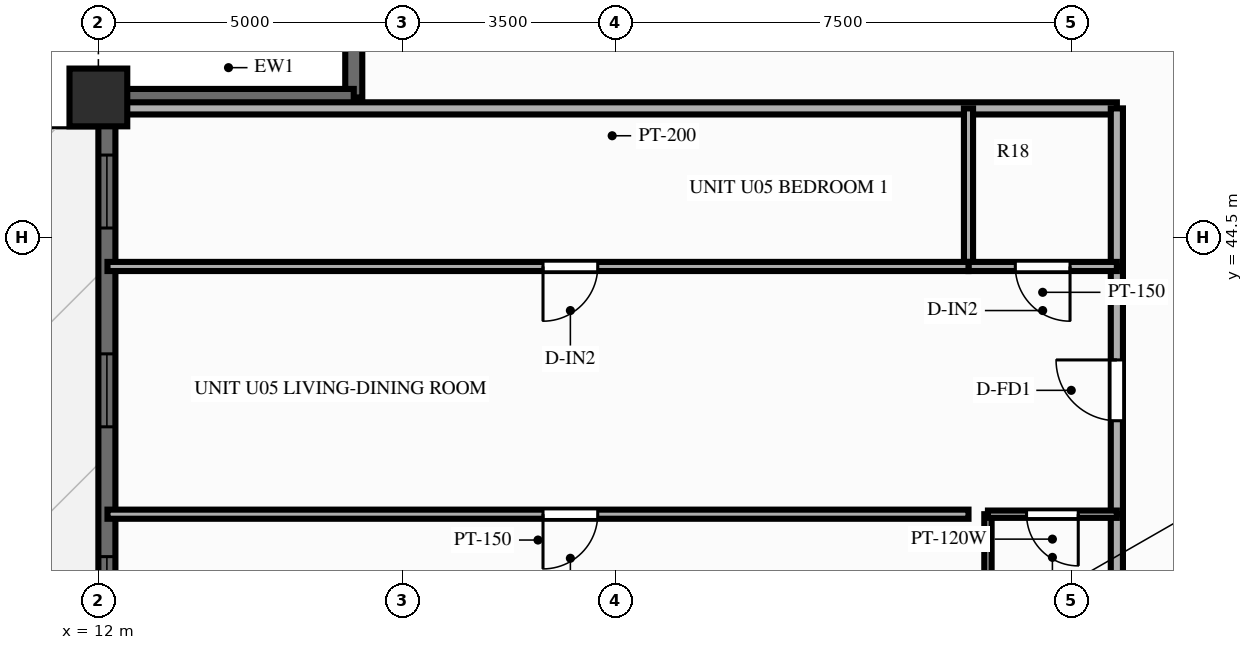
"""IFC4 building model, lengths in metres.
Left out: names, types, materials, properties, quantities, classifications, styles, units other than length and angle.
Written with IfcOpenShell. Run it as: python <this file> out.ifc"""

import sys

from ifc_helpers import new_model, si_unit, direction, frame, frame_2d, origin, origin_2d, place, context, subcontext, project, spatial, rectangle, extrude, source, transform, mapped, element, fill, save


model = new_model("IFC4")
c1 = context("Model", 3, precision=1e-05, world=origin(), true_north=direction((0.0, 1.0)))
c2 = subcontext(c1, "Body", "Model", "MODEL_VIEW")
j1 = project(units=[si_unit("LENGTHUNIT", "METRE"), si_unit("PLANEANGLEUNIT", "RADIAN")], contexts=[c1])
p1 = place(None, origin())
s1 = spatial("IfcSite", under=j1, at=p1, CompositionType="ELEMENT")
p2 = place(p1, origin())
s2 = spatial("IfcBuilding", under=s1, at=p2, CompositionType="ELEMENT")
p3 = place(p2, frame((0.0, 0.0, 138.75)))
s3 = spatial("IfcBuildingStorey", under=s2, at=p3, CompositionType="ELEMENT", Elevation=138.75)
m1 = source(origin(), c2, "Body", "SweptSolid", [
    extrude(rectangle(XDim=0.95, YDim=0.95, at=origin_2d()), origin(), (0.0, 0.0, 1.0), 3.0),
])
p4 = place(p3, frame((12.0, 46.8, 0.0), z_axis=(0.0, 0.0, 1.0), x_axis=(1.0, 0.0, 0.0)))
e1 = element("IfcColumn", 1, at=p4, inside=s3, PredefinedType="COLUMN", context=c2, shape_type="MappedRepresentation", body=[
    mapped(m1, transform((0.0, 0.0, 0.0), scale=1.0)),
])
p5 = place(p3, frame((12.14, 7.2, 0.0), z_axis=(0.0, 0.0, 1.0), x_axis=(0.0, 1.0, 0.0)))
e2 = element("IfcWall", 2, at=p5, inside=s3, PredefinedType="SOLIDWALL", context=c2, shape_type="SweptSolid", body=[
    extrude(rectangle(XDim=39.6, YDim=0.28, at=frame_2d((19.8, 0.0))), origin(), (0.0, 0.0, 1.0), 2.28),
])
p6 = place(p5, frame((0.945, 0.0, 0.25)))
e3 = element("IfcOpeningElement", 3, at=p6, cuts=e2, PredefinedType="OPENING", context=c2, shape_type="SweptSolid", body=[
    extrude(rectangle(XDim=1.2, YDim=1.5, at=frame_2d((0.6, 0.75))), frame((0.0, 0.152, 0.0), z_axis=(0.0, -1.0, 0.0), x_axis=(1.0, 0.0, 0.0)), (0.0, 0.0, 1.0), 0.304),
])
p7 = place(p5, frame((4.213, 0.0, 0.25)))
e4 = element("IfcOpeningElement", 4, at=p7, cuts=e2, PredefinedType="OPENING", context=c2, shape_type="SweptSolid", body=[
    extrude(rectangle(XDim=1.2, YDim=1.5, at=frame_2d((0.6, 0.75))), frame((0.0, 0.152, 0.0), z_axis=(0.0, -1.0, 0.0), x_axis=(1.0, 0.0, 0.0)), (0.0, 0.0, 1.0), 0.304),
])
p8 = place(p5, frame((7.55, 0.0, 0.25)))
e5 = element("IfcOpeningElement", 5, at=p8, cuts=e2, PredefinedType="OPENING", context=c2, shape_type="SweptSolid", body=[
    extrude(rectangle(XDim=1.2, YDim=1.5, at=frame_2d((0.6, 0.75))), frame((0.0, 0.152, 0.0), z_axis=(0.0, -1.0, 0.0), x_axis=(1.0, 0.0, 0.0)), (0.0, 0.0, 1.0), 0.304),
])
p9 = place(p5, frame((13.483, 0.0, 0.25)))
e6 = element("IfcOpeningElement", 6, at=p9, cuts=e2, PredefinedType="OPENING", context=c2, shape_type="SweptSolid", body=[
    extrude(rectangle(XDim=1.2, YDim=1.5, at=frame_2d((0.6, 0.75))), frame((0.0, 0.152, 0.0), z_axis=(0.0, -1.0, 0.0), x_axis=(1.0, 0.0, 0.0)), (0.0, 0.0, 1.0), 0.304),
])
p10 = place(p5, frame((16.82, 0.0, 0.25)))
e7 = element("IfcOpeningElement", 7, at=p10, cuts=e2, PredefinedType="OPENING", context=c2, shape_type="SweptSolid", body=[
    extrude(rectangle(XDim=1.2, YDim=1.5, at=frame_2d((0.6, 0.75))), frame((0.0, 0.152, 0.0), z_axis=(0.0, -1.0, 0.0), x_axis=(1.0, 0.0, 0.0)), (0.0, 0.0, 1.0), 0.304),
])
p11 = place(p5, frame((19.2, 0.0, 0.25)))
e8 = element("IfcOpeningElement", 8, at=p11, cuts=e2, PredefinedType="OPENING", context=c2, shape_type="SweptSolid", body=[
    extrude(rectangle(XDim=1.2, YDim=1.5, at=frame_2d((0.6, 0.75))), frame((0.0, 0.152, 0.0), z_axis=(0.0, -1.0, 0.0), x_axis=(1.0, 0.0, 0.0)), (0.0, 0.0, 1.0), 0.304),
])
p12 = place(p5, frame((21.578, 0.0, 0.25)))
e9 = element("IfcOpeningElement", 9, at=p12, cuts=e2, PredefinedType="OPENING", context=c2, shape_type="SweptSolid", body=[
    extrude(rectangle(XDim=1.2, YDim=1.5, at=frame_2d((0.6, 0.75))), frame((0.0, 0.152, 0.0), z_axis=(0.0, -1.0, 0.0), x_axis=(1.0, 0.0, 0.0)), (0.0, 0.0, 1.0), 0.304),
])
p13 = place(p5, frame((24.713, 0.0, 0.0)))
e10 = element("IfcOpeningElement", 10, at=p13, cuts=e2, PredefinedType="OPENING", context=c2, shape_type="SweptSolid", body=[
    extrude(rectangle(XDim=1.6, YDim=2.15, at=frame_2d((0.8, 1.075))), frame((0.0, 0.152, 0.0), z_axis=(0.0, -1.0, 0.0), x_axis=(1.0, 0.0, 0.0)), (0.0, 0.0, 1.0), 0.304),
])
p14 = place(p5, frame((29.305, 0.0, 0.25)))
e11 = element("IfcOpeningElement", 11, at=p14, cuts=e2, PredefinedType="OPENING", context=c2, shape_type="SweptSolid", body=[
    extrude(rectangle(XDim=0.7, YDim=1.5, at=frame_2d((0.35, 0.75))), frame((0.0, 0.152, 0.0), z_axis=(0.0, -1.0, 0.0), x_axis=(1.0, 0.0, 0.0)), (0.0, 0.0, 1.0), 0.304),
])
p15 = place(p5, frame((30.848, 0.0, 0.25)))
e12 = element("IfcOpeningElement", 12, at=p15, cuts=e2, PredefinedType="OPENING", context=c2, shape_type="SweptSolid", body=[
    extrude(rectangle(XDim=1.2, YDim=1.5, at=frame_2d((0.6, 0.75))), frame((0.0, 0.152, 0.0), z_axis=(0.0, -1.0, 0.0), x_axis=(1.0, 0.0, 0.0)), (0.0, 0.0, 1.0), 0.304),
])
p16 = place(p5, frame((34.183, 0.0, 0.25)))
e13 = element("IfcOpeningElement", 13, at=p16, cuts=e2, PredefinedType="OPENING", context=c2, shape_type="SweptSolid", body=[
    extrude(rectangle(XDim=1.2, YDim=1.5, at=frame_2d((0.6, 0.75))), frame((0.0, 0.152, 0.0), z_axis=(0.0, -1.0, 0.0), x_axis=(1.0, 0.0, 0.0)), (0.0, 0.0, 1.0), 0.304),
])
p17 = place(p5, frame((37.452, 0.0, 0.25)))
e14 = element("IfcOpeningElement", 14, at=p17, cuts=e2, PredefinedType="OPENING", context=c2, shape_type="SweptSolid", body=[
    extrude(rectangle(XDim=1.2, YDim=1.5, at=frame_2d((0.6, 0.75))), frame((0.0, 0.152, 0.0), z_axis=(0.0, -1.0, 0.0), x_axis=(1.0, 0.0, 0.0)), (0.0, 0.0, 1.0), 0.304),
])
for number, where, z_axis, x_axis in (
    (15, (16.2, 46.8, 0.0), (0.0, 0.0, 1.0), (0.0, 1.0, 0.0)),
    (16, (12.08, 46.8, 0.0), (0.0, 0.0, 1.0), (1.0, 0.0, 0.0)),
):
    element("IfcWall", number, at=place(p3, frame(where, z_axis=z_axis, x_axis=x_axis)), inside=s3, PredefinedType="SOLIDWALL", context=c2, shape_type="SweptSolid", body=[
        extrude(rectangle(XDim=4.12, YDim=0.28, at=frame_2d((2.06, 0.0))), origin(), (0.0, 0.0, 1.0), 2.28),
    ])
p18 = place(p3, frame((28.75, 46.62, 0.0), z_axis=(0.0, 0.0, 1.0), x_axis=(-1.0, 0.0, 0.0)))
e17 = element("IfcWall", 17, at=p18, inside=s3, PredefinedType="PARTITIONING", context=c2, shape_type="SweptSolid", body=[
    extrude(rectangle(XDim=16.6, YDim=0.2, at=frame_2d((8.3, 0.0))), origin(), (0.0, 0.0, 1.0), 2.79),
])
p19 = place(p3, frame((28.75, 37.35, 0.0), z_axis=(0.0, 0.0, 1.0), x_axis=(0.0, 1.0, 0.0)))
e18 = element("IfcWall", 18, at=p19, inside=s3, PredefinedType="PARTITIONING", context=c2, shape_type="SweptSolid", body=[
    extrude(rectangle(XDim=2.595, YDim=0.2, at=frame_2d((1.298, 0.0))), origin(), (0.0, 0.0, 1.0), 2.79),
])
p20 = place(p3, frame((28.75, 39.946, 0.0), z_axis=(0.0, 0.0, 1.0), x_axis=(0.0, 1.0, 0.0)))
e19 = element("IfcWall", 19, at=p20, inside=s3, PredefinedType="PARTITIONING", context=c2, shape_type="SweptSolid", body=[
    extrude(rectangle(XDim=4.074, YDim=0.2, at=frame_2d((2.037, 0.0))), origin(), (0.0, 0.0, 1.0), 2.79),
])
p21 = place(p20, frame((1.537, 0.0, 0.0)))
e20 = element("IfcOpeningElement", 20, at=p21, cuts=e19, PredefinedType="OPENING", context=c2, shape_type="SweptSolid", body=[
    extrude(rectangle(XDim=1.0, YDim=2.15, at=frame_2d((0.5, 1.075))), frame((0.0, 0.112, 0.0), z_axis=(0.0, -1.0, 0.0), x_axis=(1.0, 0.0, 0.0)), (0.0, 0.0, 1.0), 0.224),
])
p22 = place(p3, frame((28.75, 44.02, 0.0), z_axis=(0.0, 0.0, 1.0), x_axis=(0.0, 1.0, 0.0)))
e21 = element("IfcWall", 21, at=p22, inside=s3, PredefinedType="PARTITIONING", context=c2, shape_type="SweptSolid", body=[
    extrude(rectangle(XDim=2.6, YDim=0.2, at=frame_2d((1.3, 0.0))), origin(), (0.0, 0.0, 1.0), 2.79),
])
p23 = place(p3, frame((26.63, 37.35, 0.0), z_axis=(0.0, 0.0, 1.0), x_axis=(0.0, 1.0, 0.0)))
e22 = element("IfcWall", 22, at=p23, inside=s3, PredefinedType="PARTITIONING", context=c2, shape_type="SweptSolid", body=[
    extrude(rectangle(XDim=2.595, YDim=0.12, at=frame_2d((1.298, 0.0))), origin(), (0.0, 0.0, 1.0), 2.79),
])
p24 = place(p3, frame((26.31, 44.02, 0.0), z_axis=(0.0, 0.0, 1.0), x_axis=(0.0, 1.0, 0.0)))
e23 = element("IfcWall", 23, at=p24, inside=s3, PredefinedType="PARTITIONING", context=c2, shape_type="SweptSolid", body=[
    extrude(rectangle(XDim=2.6, YDim=0.15, at=frame_2d((1.3, 0.0))), origin(), (0.0, 0.0, 1.0), 2.79),
])
p25 = place(p3, frame((28.75, 39.946, 0.0), z_axis=(0.0, 0.0, 1.0), x_axis=(-1.0, 0.0, 0.0)))
e24 = element("IfcWall", 24, at=p25, inside=s3, PredefinedType="PARTITIONING", context=c2, shape_type="SweptSolid", body=[
    extrude(rectangle(XDim=2.12, YDim=0.12, at=frame_2d((1.06, 0.0))), origin(), (0.0, 0.0, 1.0), 2.79),
])
p26 = place(p25, frame((0.635, 0.0, 0.0)))
e25 = element("IfcOpeningElement", 25, at=p26, cuts=e24, PredefinedType="OPENING", context=c2, shape_type="SweptSolid", body=[
    extrude(rectangle(XDim=0.85, YDim=2.05, at=frame_2d((0.425, 1.025))), frame((0.0, 0.072, 0.0), z_axis=(0.0, -1.0, 0.0), x_axis=(1.0, 0.0, 0.0)), (0.0, 0.0, 1.0), 0.144),
])
p27 = place(p3, frame((26.31, 39.946, 0.0), z_axis=(0.0, 0.0, 1.0), x_axis=(-1.0, 0.0, 0.0)))
e26 = element("IfcWall", 26, at=p27, inside=s3, PredefinedType="PARTITIONING", context=c2, shape_type="SweptSolid", body=[
    extrude(rectangle(XDim=14.16, YDim=0.15, at=frame_2d((7.08, 0.0))), origin(), (0.0, 0.0, 1.0), 2.79),
])
p28 = place(p27, frame((6.097, 0.0, 0.0)))
e27 = element("IfcOpeningElement", 27, at=p28, cuts=e26, PredefinedType="OPENING", context=c2, shape_type="SweptSolid", body=[
    extrude(rectangle(XDim=0.9, YDim=2.1, at=frame_2d((0.45, 1.05))), frame((0.0, 0.087, 0.0), z_axis=(0.0, -1.0, 0.0), x_axis=(1.0, 0.0, 0.0)), (0.0, 0.0, 1.0), 0.174),
])
p29 = place(p3, frame((28.75, 44.02, 0.0), z_axis=(0.0, 0.0, 1.0), x_axis=(-1.0, 0.0, 0.0)))
e28 = element("IfcWall", 28, at=p29, inside=s3, PredefinedType="PARTITIONING", context=c2, shape_type="SweptSolid", body=[
    extrude(rectangle(XDim=2.44, YDim=0.15, at=frame_2d((1.22, 0.0))), origin(), (0.0, 0.0, 1.0), 2.79),
])
p30 = place(p29, frame((0.77, 0.0, 0.0)))
e29 = element("IfcOpeningElement", 29, at=p30, cuts=e28, PredefinedType="OPENING", context=c2, shape_type="SweptSolid", body=[
    extrude(rectangle(XDim=0.9, YDim=2.1, at=frame_2d((0.45, 1.05))), frame((0.0, 0.087, 0.0), z_axis=(0.0, -1.0, 0.0), x_axis=(1.0, 0.0, 0.0)), (0.0, 0.0, 1.0), 0.174),
])
p31 = place(p3, frame((26.31, 44.02, 0.0), z_axis=(0.0, 0.0, 1.0), x_axis=(-1.0, 0.0, 0.0)))
e30 = element("IfcWall", 30, at=p31, inside=s3, PredefinedType="PARTITIONING", context=c2, shape_type="SweptSolid", body=[
    extrude(rectangle(XDim=14.16, YDim=0.15, at=frame_2d((7.08, 0.0))), origin(), (0.0, 0.0, 1.0), 2.79),
])
p32 = place(p31, frame((6.097, 0.0, 0.0)))
e31 = element("IfcOpeningElement", 31, at=p32, cuts=e30, PredefinedType="OPENING", context=c2, shape_type="SweptSolid", body=[
    extrude(rectangle(XDim=0.9, YDim=2.1, at=frame_2d((0.45, 1.05))), frame((0.0, 0.087, 0.0), z_axis=(0.0, -1.0, 0.0), x_axis=(1.0, 0.0, 0.0)), (0.0, 0.0, 1.0), 0.174),
])
m2 = source(origin(), c2, "Body", "SweptSolid", [
    extrude(rectangle(XDim=1.2, YDim=1.5, at=frame_2d((0.6, 0.75))), frame((0.0, 0.03, 0.0), z_axis=(0.0, -1.0, 0.0), x_axis=(1.0, 0.0, 0.0)), (0.0, 0.0, 1.0), 0.06),
])
p33 = place(p15, origin())
e32 = element("IfcWindow", 32, at=p33, inside=s3, PartitioningType="SINGLE_PANEL", PredefinedType="WINDOW", context=c2, shape_type="MappedRepresentation", body=[
    mapped(m2, transform((0.0, 0.0, 0.0), scale=1.0)),
])
fill(e12, e32)
p34 = place(p16, origin())
e33 = element("IfcWindow", 33, at=p34, inside=s3, PartitioningType="SINGLE_PANEL", PredefinedType="WINDOW", context=c2, shape_type="MappedRepresentation", body=[
    mapped(m2, transform((0.0, 0.0, 0.0), scale=1.0)),
])
fill(e13, e33)
p35 = place(p17, origin())
e34 = element("IfcWindow", 34, at=p35, inside=s3, PartitioningType="SINGLE_PANEL", PredefinedType="WINDOW", context=c2, shape_type="MappedRepresentation", body=[
    mapped(m2, transform((0.0, 0.0, 0.0), scale=1.0)),
])
fill(e14, e34)
m3 = source(origin(), c2, "Body", "SweptSolid", [
    extrude(rectangle(XDim=1.0, YDim=2.15, at=frame_2d((0.5, 1.075))), frame((0.0, 0.025, 0.0), z_axis=(0.0, -1.0, 0.0), x_axis=(1.0, 0.0, 0.0)), (0.0, 0.0, 1.0), 0.05),
])
p36 = place(p21, origin())
e35 = element("IfcDoor", 35, at=p36, inside=s3, OperationType="SINGLE_SWING_RIGHT", PredefinedType="DOOR", context=c2, shape_type="MappedRepresentation", body=[
    mapped(m3, transform((0.0, 0.0, 0.0), scale=1.0)),
])
fill(e20, e35)
m4 = source(origin(), c2, "Body", "SweptSolid", [
    extrude(rectangle(XDim=0.85, YDim=2.05, at=frame_2d((0.425, 1.025))), frame((0.0, 0.025, 0.0), z_axis=(0.0, -1.0, 0.0), x_axis=(1.0, 0.0, 0.0)), (0.0, 0.0, 1.0), 0.05),
])
p37 = place(p26, origin())
e36 = element("IfcDoor", 36, at=p37, inside=s3, OperationType="SINGLE_SWING_LEFT", PredefinedType="DOOR", context=c2, shape_type="MappedRepresentation", body=[
    mapped(m4, transform((0.0, 0.0, 0.0), scale=1.0)),
])
fill(e25, e36)
m5 = source(origin(), c2, "Body", "SweptSolid", [
    extrude(rectangle(XDim=0.9, YDim=2.1, at=frame_2d((0.45, 1.05))), frame((0.0, 0.025, 0.0), z_axis=(0.0, -1.0, 0.0), x_axis=(1.0, 0.0, 0.0)), (0.0, 0.0, 1.0), 0.05),
])
p38 = place(p28, origin())
e37 = element("IfcDoor", 37, at=p38, inside=s3, OperationType="SINGLE_SWING_RIGHT", PredefinedType="DOOR", context=c2, shape_type="MappedRepresentation", body=[
    mapped(m5, transform((0.0, 0.0, 0.0), scale=1.0)),
])
fill(e27, e37)
p39 = place(p30, origin())
e38 = element("IfcDoor", 38, at=p39, inside=s3, OperationType="SINGLE_SWING_LEFT", PredefinedType="DOOR", context=c2, shape_type="MappedRepresentation", body=[
    mapped(m5, transform((0.0, 0.0, 0.0), scale=1.0)),
])
fill(e29, e38)
p40 = place(p32, origin())
e39 = element("IfcDoor", 39, at=p40, inside=s3, OperationType="SINGLE_SWING_RIGHT", PredefinedType="DOOR", context=c2, shape_type="MappedRepresentation", body=[
    mapped(m5, transform((0.0, 0.0, 0.0), scale=1.0)),
])
fill(e31, e39)
save(model, sys.argv[1])
